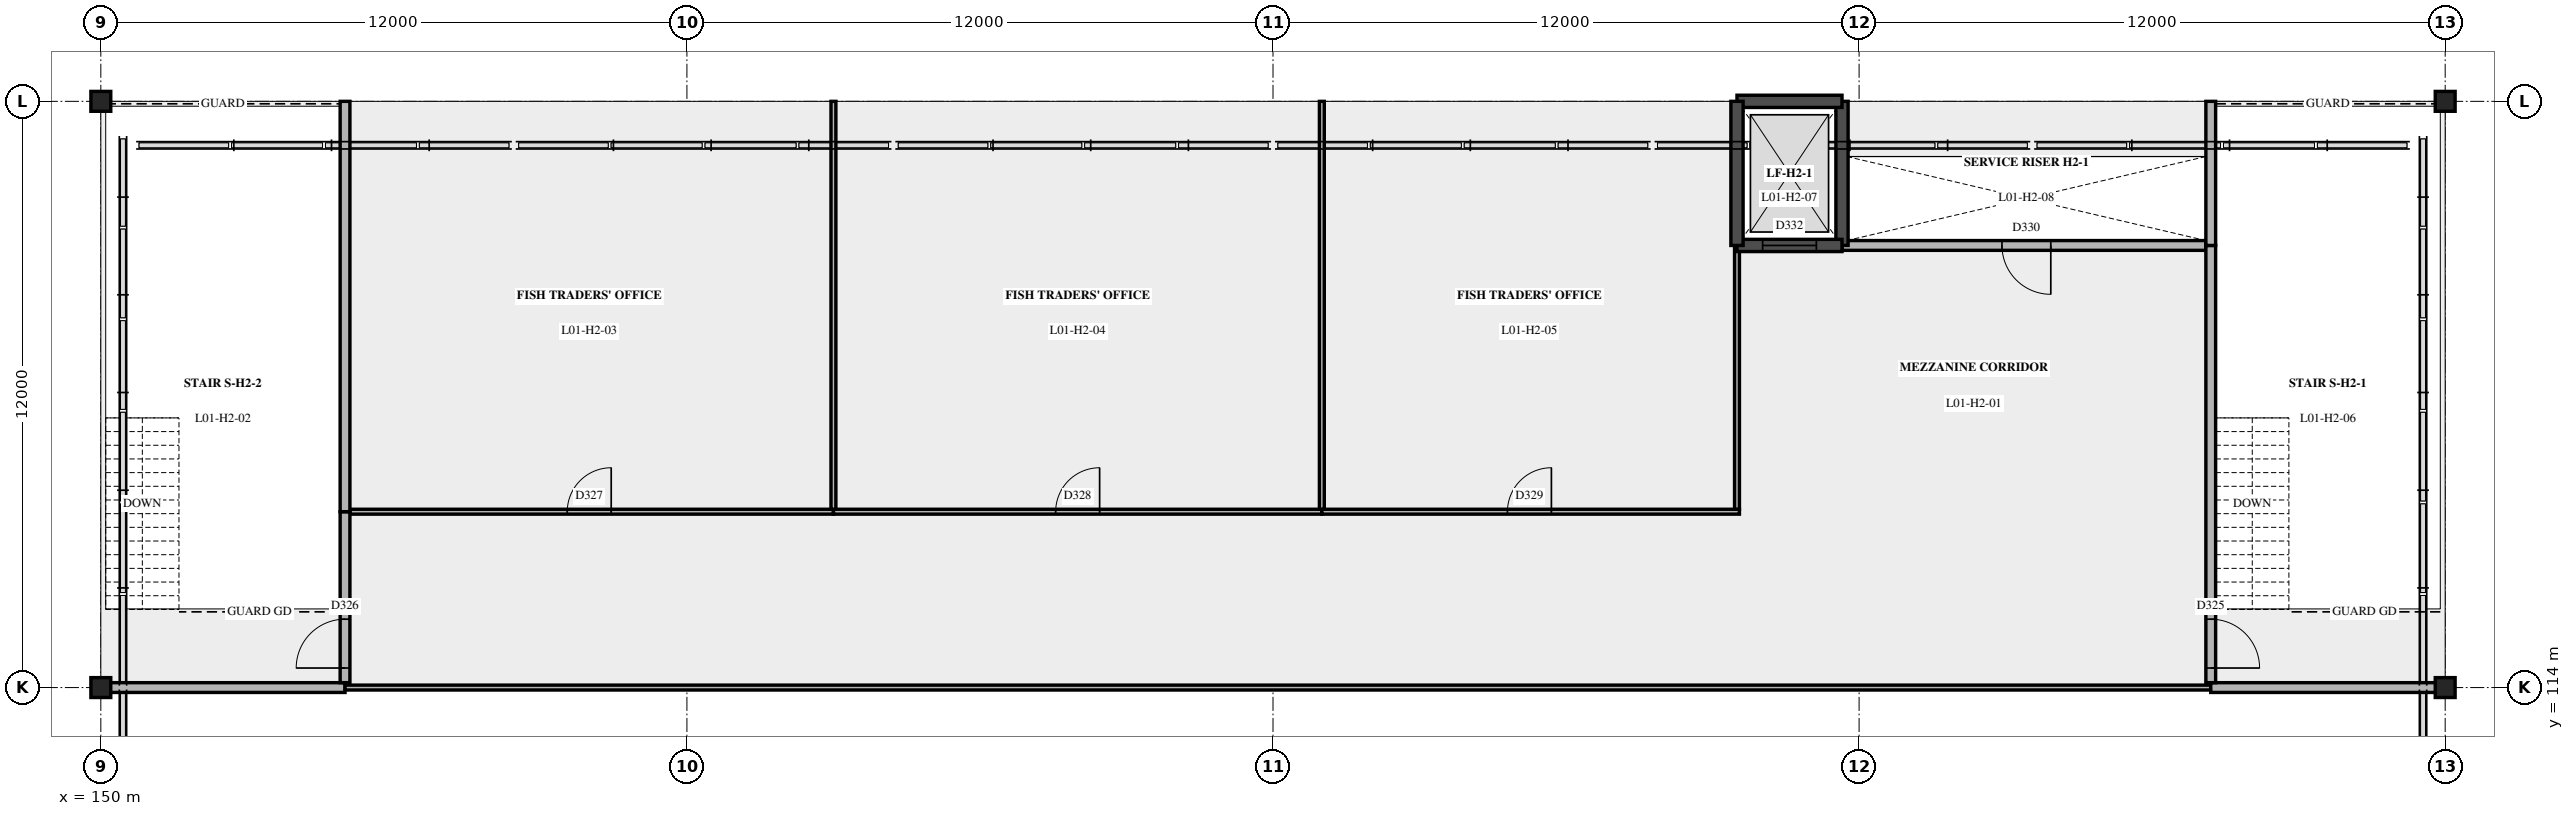
"""IFC4 building model, lengths in metres.
Left out: names, types, materials, properties, quantities, classifications, styles, units other than length and angle.
Written with IfcOpenShell. Run it as: python <this file> out.ifc"""

import sys

from ifc_helpers import new_model, si_unit, direction, frame, frame_2d, origin, origin_2d, place, context, subcontext, project, spatial, rectangle, hollow_circle, extrude, element, fill, save


model = new_model("IFC4")
c1 = context("Model", 3, precision=1e-05, world=origin(), true_north=direction((0.0, 1.0)))
c2 = subcontext(c1, "Body", "Model", "MODEL_VIEW")
j1 = project(units=[si_unit("LENGTHUNIT", "METRE"), si_unit("PLANEANGLEUNIT", "RADIAN")], contexts=[c1])
p1 = place(None, origin())
s1 = spatial("IfcSite", under=j1, at=p1, CompositionType="ELEMENT")
p2 = place(p1, origin())
s2 = spatial("IfcBuilding", under=s1, at=p2, CompositionType="ELEMENT")
p3 = place(p2, frame((0.0, 0.0, 5.4)))
s3 = spatial("IfcBuildingStorey", under=s2, at=p3, CompositionType="ELEMENT", Elevation=5.4)
for number, where, z_axis, x_axis in (
    (1, (150.0, 114.0, 0.0), (0.0, 0.0, 1.0), (1.0, 0.0, 0.0)),
    (2, (150.0, 126.0, 0.0), (0.0, 0.0, 1.0), (1.0, 0.0, 0.0)),
    (3, (198.0, 114.0, 0.0), (0.0, 0.0, 1.0), (1.0, 0.0, 0.0)),
    (4, (198.0, 126.0, 0.0), (0.0, 0.0, 1.0), (1.0, 0.0, 0.0)),
):
    element("IfcColumn", number, at=place(p3, frame(where, z_axis=z_axis, x_axis=x_axis)), inside=s3, PredefinedType="COLUMN", context=c2, shape_type="SweptSolid", body=[
        extrude(hollow_circle(Radius=0.203, WallThickness=0.016, at=origin_2d()), origin(), (0.0, 0.0, 1.0), 5.4),
    ])
p4 = place(p3, frame((150.0, 114.0, 0.0), z_axis=(0.0, 0.0, 1.0), x_axis=(1.0, 0.0, 0.0)))
e5 = element("IfcWall", 5, at=p4, inside=s3, PredefinedType="PARTITIONING", context=c2, shape_type="SweptSolid", body=[
    extrude(rectangle(XDim=5.0, YDim=0.2, at=frame_2d((2.5, 0.0))), origin(), (0.0, 0.0, 1.0), 2.6),
])
p5 = place(p3, frame((155.0, 114.0, 0.0), z_axis=(0.0, 0.0, 1.0), x_axis=(1.0, 0.0, 0.0)))
e6 = element("IfcWall", 6, at=p5, inside=s3, PredefinedType="PARTITIONING", context=c2, shape_type="SweptSolid", body=[
    extrude(rectangle(XDim=38.2, YDim=0.1, at=frame_2d((19.1, 0.0))), origin(), (0.0, 0.0, 1.0), 2.6),
])
p6 = place(p3, frame((193.2, 114.0, 0.0), z_axis=(0.0, 0.0, 1.0), x_axis=(1.0, 0.0, 0.0)))
e7 = element("IfcWall", 7, at=p6, inside=s3, PredefinedType="PARTITIONING", context=c2, shape_type="SweptSolid", body=[
    extrude(rectangle(XDim=4.8, YDim=0.2, at=frame_2d((2.4, 0.0))), origin(), (0.0, 0.0, 1.0), 2.6),
])
p7 = place(p3, frame((155.1, 117.6, 0.0), z_axis=(0.0, 0.0, 1.0), x_axis=(1.0, 0.0, 0.0)))
e8 = element("IfcWall", 8, at=p7, inside=s3, PredefinedType="PARTITIONING", context=c2, shape_type="SweptSolid", body=[
    extrude(rectangle(XDim=9.9, YDim=0.1, at=frame_2d((4.95, 0.0))), origin(), (0.0, 0.0, 1.0), 2.6),
])
p8 = place(p7, frame((4.45, 0.0, 0.0)))
e9 = element("IfcOpeningElement", 9, at=p8, cuts=e8, PredefinedType="OPENING", context=c2, shape_type="SweptSolid", body=[
    extrude(rectangle(XDim=0.9, YDim=2.1, at=frame_2d((0.45, 1.05))), frame((0.0, 0.06, 0.0), z_axis=(0.0, -1.0, 0.0), x_axis=(1.0, 0.0, 0.0)), (0.0, 0.0, 1.0), 0.12),
])
p9 = place(p3, frame((165.0, 117.6, 0.0), z_axis=(0.0, 0.0, 1.0), x_axis=(1.0, 0.0, 0.0)))
e10 = element("IfcWall", 10, at=p9, inside=s3, PredefinedType="PARTITIONING", context=c2, shape_type="SweptSolid", body=[
    extrude(rectangle(XDim=10.0, YDim=0.1, at=frame_2d((5.0, 0.0))), origin(), (0.0, 0.0, 1.0), 2.6),
])
p10 = place(p9, frame((4.55, 0.0, 0.0)))
e11 = element("IfcOpeningElement", 11, at=p10, cuts=e10, PredefinedType="OPENING", context=c2, shape_type="SweptSolid", body=[
    extrude(rectangle(XDim=0.9, YDim=2.1, at=frame_2d((0.45, 1.05))), frame((0.0, 0.06, 0.0), z_axis=(0.0, -1.0, 0.0), x_axis=(1.0, 0.0, 0.0)), (0.0, 0.0, 1.0), 0.12),
])
p11 = place(p3, frame((175.0, 117.6, 0.0), z_axis=(0.0, 0.0, 1.0), x_axis=(1.0, 0.0, 0.0)))
e12 = element("IfcWall", 12, at=p11, inside=s3, PredefinedType="PARTITIONING", context=c2, shape_type="SweptSolid", body=[
    extrude(rectangle(XDim=8.55, YDim=0.1, at=frame_2d((4.275, 0.0))), origin(), (0.0, 0.0, 1.0), 2.6),
])
p12 = place(p11, frame((3.8, 0.0, 0.0)))
e13 = element("IfcOpeningElement", 13, at=p12, cuts=e12, PredefinedType="OPENING", context=c2, shape_type="SweptSolid", body=[
    extrude(rectangle(XDim=0.9, YDim=2.1, at=frame_2d((0.45, 1.05))), frame((0.0, 0.06, 0.0), z_axis=(0.0, -1.0, 0.0), x_axis=(1.0, 0.0, 0.0)), (0.0, 0.0, 1.0), 0.12),
])
p13 = place(p3, frame((185.65, 123.05, 0.0), z_axis=(0.0, 0.0, 1.0), x_axis=(1.0, 0.0, 0.0)))
e14 = element("IfcWall", 14, at=p13, inside=s3, PredefinedType="PARTITIONING", context=c2, shape_type="SweptSolid", body=[
    extrude(rectangle(XDim=7.45, YDim=0.2, at=frame_2d((3.725, 0.0))), origin(), (0.0, 0.0, 1.0), 2.6),
])
p14 = place(p13, frame((3.275, 0.0, 0.0)))
e15 = element("IfcOpeningElement", 15, at=p14, cuts=e14, PredefinedType="OPENING", context=c2, shape_type="SweptSolid", body=[
    extrude(rectangle(XDim=1.0, YDim=2.1, at=frame_2d((0.5, 1.05))), frame((0.0, 0.11, 0.0), z_axis=(0.0, -1.0, 0.0), x_axis=(1.0, 0.0, 0.0)), (0.0, 0.0, 1.0), 0.22),
])
p15 = place(p3, frame((155.0, 114.1, 0.0), z_axis=(0.0, 0.0, 1.0), x_axis=(0.0, 1.0, 0.0)))
e16 = element("IfcWall", 16, at=p15, inside=s3, PredefinedType="PARTITIONING", context=c2, shape_type="SweptSolid", body=[
    extrude(rectangle(XDim=3.5, YDim=0.2, at=frame_2d((1.75, 0.0))), origin(), (0.0, 0.0, 1.0), 2.6),
])
p16 = place(p15, frame((0.3, 0.0, 0.0)))
e17 = element("IfcOpeningElement", 17, at=p16, cuts=e16, PredefinedType="OPENING", context=c2, shape_type="SweptSolid", body=[
    extrude(rectangle(XDim=1.0, YDim=2.1, at=frame_2d((0.5, 1.05))), frame((0.0, 0.11, 0.0), z_axis=(0.0, -1.0, 0.0), x_axis=(1.0, 0.0, 0.0)), (0.0, 0.0, 1.0), 0.22),
])
p17 = place(p3, frame((155.0, 117.6, 0.0), z_axis=(0.0, 0.0, 1.0), x_axis=(0.0, 1.0, 0.0)))
e18 = element("IfcWall", 18, at=p17, inside=s3, PredefinedType="PARTITIONING", context=c2, shape_type="SweptSolid", body=[
    extrude(rectangle(XDim=8.4, YDim=0.2, at=frame_2d((4.2, 0.0))), origin(), (0.0, 0.0, 1.0), 2.6),
])
for number, where, z_axis, x_axis in (
    (19, (165.0, 117.65, 0.0), (0.0, 0.0, 1.0), (0.0, 1.0, 0.0)),
    (20, (175.0, 117.65, 0.0), (0.0, 0.0, 1.0), (0.0, 1.0, 0.0)),
):
    element("IfcWall", number, at=place(p3, frame(where, z_axis=z_axis, x_axis=x_axis)), inside=s3, PredefinedType="PARTITIONING", context=c2, shape_type="SweptSolid", body=[
        extrude(rectangle(XDim=8.35, YDim=0.1, at=frame_2d((4.175, 0.0))), origin(), (0.0, 0.0, 1.0), 2.6),
    ])
p18 = place(p3, frame((183.5, 117.65, 0.0), z_axis=(0.0, 0.0, 1.0), x_axis=(0.0, 1.0, 0.0)))
e21 = element("IfcWall", 21, at=p18, inside=s3, PredefinedType="PARTITIONING", context=c2, shape_type="SweptSolid", body=[
    extrude(rectangle(XDim=5.4, YDim=0.1, at=frame_2d((2.7, 0.0))), origin(), (0.0, 0.0, 1.0), 2.6),
])
p19 = place(p3, frame((193.2, 114.1, 0.0), z_axis=(0.0, 0.0, 1.0), x_axis=(0.0, 1.0, 0.0)))
e22 = element("IfcWall", 22, at=p19, inside=s3, PredefinedType="PARTITIONING", context=c2, shape_type="SweptSolid", body=[
    extrude(rectangle(XDim=8.95, YDim=0.2, at=frame_2d((4.475, 0.0))), origin(), (0.0, 0.0, 1.0), 2.6),
])
p20 = place(p19, frame((0.3, 0.0, 0.0)))
e23 = element("IfcOpeningElement", 23, at=p20, cuts=e22, PredefinedType="OPENING", context=c2, shape_type="SweptSolid", body=[
    extrude(rectangle(XDim=1.0, YDim=2.1, at=frame_2d((0.5, 1.05))), frame((0.0, 0.11, 0.0), z_axis=(0.0, -1.0, 0.0), x_axis=(1.0, 0.0, 0.0)), (0.0, 0.0, 1.0), 0.22),
])
p21 = place(p3, frame((193.2, 123.05, 0.0), z_axis=(0.0, 0.0, 1.0), x_axis=(0.0, 1.0, 0.0)))
e24 = element("IfcWall", 24, at=p21, inside=s3, PredefinedType="PARTITIONING", context=c2, shape_type="SweptSolid", body=[
    extrude(rectangle(XDim=2.95, YDim=0.2, at=frame_2d((1.475, 0.0))), origin(), (0.0, 0.0, 1.0), 2.6),
])
p22 = place(p3, frame((185.65, 123.05, 0.0), z_axis=(0.0, 0.0, 1.0), x_axis=(0.0, 1.0, 0.0)))
e25 = element("IfcWall", 25, at=p22, inside=s3, PredefinedType="SHEAR", context=c2, shape_type="SweptSolid", body=[
    extrude(rectangle(XDim=2.95, YDim=0.25, at=frame_2d((1.475, 0.0))), origin(), (0.0, 0.0, 1.0), 4.2),
])
p23 = place(p3, frame((185.65, 126.0, 0.0), z_axis=(0.0, 0.0, 1.0), x_axis=(-1.0, 0.0, 0.0)))
e26 = element("IfcWall", 26, at=p23, inside=s3, PredefinedType="SHEAR", context=c2, shape_type="SweptSolid", body=[
    extrude(rectangle(XDim=2.15, YDim=0.25, at=frame_2d((1.075, 0.0))), origin(), (0.0, 0.0, 1.0), 4.2),
])
p24 = place(p3, frame((183.5, 123.05, 0.0), z_axis=(0.0, 0.0, 1.0), x_axis=(1.0, 0.0, 0.0)))
e27 = element("IfcWall", 27, at=p24, inside=s3, PredefinedType="SHEAR", context=c2, shape_type="SweptSolid", body=[
    extrude(rectangle(XDim=2.15, YDim=0.25, at=frame_2d((1.075, 0.0))), origin(), (0.0, 0.0, 1.0), 4.2),
])
p25 = place(p24, frame((0.525, 0.0, 0.0)))
e28 = element("IfcOpeningElement", 28, at=p25, cuts=e27, PredefinedType="OPENING", context=c2, shape_type="SweptSolid", body=[
    extrude(rectangle(XDim=1.1, YDim=2.1, at=frame_2d((0.55, 1.05))), frame((0.0, 0.135, 0.0), z_axis=(0.0, -1.0, 0.0), x_axis=(1.0, 0.0, 0.0)), (0.0, 0.0, 1.0), 0.27),
])
p26 = place(p3, frame((183.5, 126.0, 0.0), z_axis=(0.0, 0.0, 1.0), x_axis=(0.0, -1.0, 0.0)))
e29 = element("IfcWall", 29, at=p26, inside=s3, PredefinedType="SHEAR", context=c2, shape_type="SweptSolid", body=[
    extrude(rectangle(XDim=2.95, YDim=0.25, at=frame_2d((1.475, 0.0))), origin(), (0.0, 0.0, 1.0), 4.2),
])
p27 = place(p20, origin())
e30 = element("IfcDoor", 30, at=p27, inside=s3, OperationType="SINGLE_SWING_RIGHT", PredefinedType="DOOR", context=c2, shape_type="SweptSolid", body=[
    extrude(rectangle(XDim=1.0, YDim=2.1, at=frame_2d((0.5, 1.05))), frame((0.0, 0.025, 0.0), z_axis=(0.0, -1.0, 0.0), x_axis=(1.0, 0.0, 0.0)), (0.0, 0.0, 1.0), 0.05),
])
fill(e23, e30)
p28 = place(p16, origin())
e31 = element("IfcDoor", 31, at=p28, inside=s3, OperationType="SINGLE_SWING_LEFT", PredefinedType="DOOR", context=c2, shape_type="SweptSolid", body=[
    extrude(rectangle(XDim=1.0, YDim=2.1, at=frame_2d((0.5, 1.05))), frame((0.0, 0.025, 0.0), z_axis=(0.0, -1.0, 0.0), x_axis=(1.0, 0.0, 0.0)), (0.0, 0.0, 1.0), 0.05),
])
fill(e17, e31)
p29 = place(p8, origin())
e32 = element("IfcDoor", 32, at=p29, inside=s3, OperationType="SINGLE_SWING_RIGHT", PredefinedType="DOOR", context=c2, shape_type="SweptSolid", body=[
    extrude(rectangle(XDim=0.9, YDim=2.1, at=frame_2d((0.45, 1.05))), frame((0.0, 0.025, 0.0), z_axis=(0.0, -1.0, 0.0), x_axis=(1.0, 0.0, 0.0)), (0.0, 0.0, 1.0), 0.05),
])
fill(e9, e32)
p30 = place(p10, origin())
e33 = element("IfcDoor", 33, at=p30, inside=s3, OperationType="SINGLE_SWING_RIGHT", PredefinedType="DOOR", context=c2, shape_type="SweptSolid", body=[
    extrude(rectangle(XDim=0.9, YDim=2.1, at=frame_2d((0.45, 1.05))), frame((0.0, 0.025, 0.0), z_axis=(0.0, -1.0, 0.0), x_axis=(1.0, 0.0, 0.0)), (0.0, 0.0, 1.0), 0.05),
])
fill(e11, e33)
p31 = place(p12, origin())
e34 = element("IfcDoor", 34, at=p31, inside=s3, OperationType="SINGLE_SWING_RIGHT", PredefinedType="DOOR", context=c2, shape_type="SweptSolid", body=[
    extrude(rectangle(XDim=0.9, YDim=2.1, at=frame_2d((0.45, 1.05))), frame((0.0, 0.025, 0.0), z_axis=(0.0, -1.0, 0.0), x_axis=(1.0, 0.0, 0.0)), (0.0, 0.0, 1.0), 0.05),
])
fill(e13, e34)
p32 = place(p14, origin())
e35 = element("IfcDoor", 35, at=p32, inside=s3, OperationType="SINGLE_SWING_LEFT", PredefinedType="DOOR", context=c2, shape_type="SweptSolid", body=[
    extrude(rectangle(XDim=1.0, YDim=2.1, at=frame_2d((0.5, 1.05))), frame((0.0, 0.025, 0.0), z_axis=(0.0, -1.0, 0.0), x_axis=(1.0, 0.0, 0.0)), (0.0, 0.0, 1.0), 0.05),
])
fill(e15, e35)
p33 = place(p25, origin())
e36 = element("IfcDoor", 36, at=p33, inside=s3, OperationType="SLIDING_TO_LEFT", PredefinedType="DOOR", context=c2, shape_type="SweptSolid", body=[
    extrude(rectangle(XDim=1.1, YDim=2.1, at=frame_2d((0.55, 1.05))), frame((0.0, 0.025, 0.0), z_axis=(0.0, -1.0, 0.0), x_axis=(1.0, 0.0, 0.0)), (0.0, 0.0, 1.0), 0.05),
])
fill(e28, e36)
save(model, sys.argv[1])
